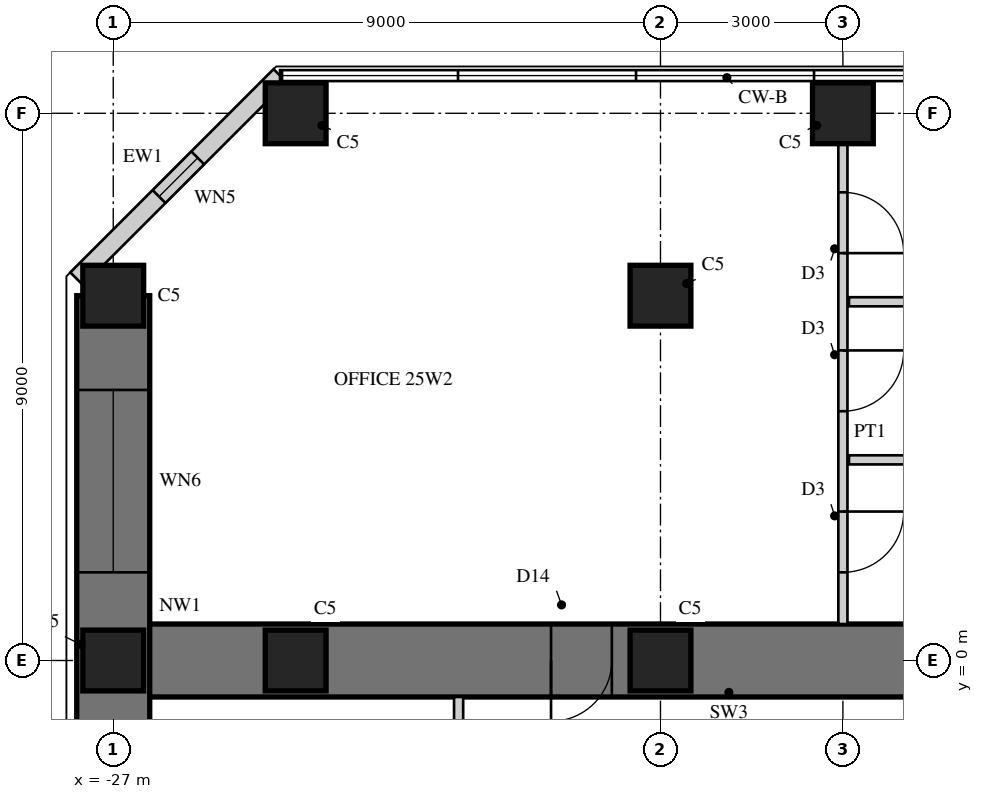
"""IFC4 building model, lengths in metres.
Left out: names, types, materials, properties, quantities, classifications, styles, units other than length and angle.
Written with IfcOpenShell. Run it as: python <this file> out.ifc"""

import sys

from ifc_helpers import new_model, si_unit, direction, frame, frame_2d, origin, origin_2d, place, context, subcontext, project, spatial, rectangle, hollow_rectangle, extrude, element, fill, save


model = new_model("IFC4")
c1 = context("Model", 3, precision=1e-05, world=origin(), true_north=direction((0.0, 1.0)))
c2 = subcontext(c1, "Body", "Model", "MODEL_VIEW")
j1 = project(units=[si_unit("LENGTHUNIT", "METRE"), si_unit("PLANEANGLEUNIT", "RADIAN")], contexts=[c1])
p1 = place(None, origin())
s1 = spatial("IfcSite", under=j1, at=p1, CompositionType="ELEMENT")
p2 = place(p1, origin())
s2 = spatial("IfcBuilding", under=s1, at=p2, CompositionType="ELEMENT")
p3 = place(p2, frame((0.0, 0.0, 104.5)))
s3 = spatial("IfcBuildingStorey", under=s2, at=p3, CompositionType="ELEMENT", Elevation=104.5)
p4 = place(p3, frame((-9.0, 0.0, 0.0), z_axis=(0.0, 0.0, 1.0), x_axis=(-1.0, 0.0, 0.0)))
e1 = element("IfcWall", 1, at=p4, inside=s3, PredefinedType="SHEAR", context=c2, shape_type="SweptSolid", body=[
    extrude(rectangle(XDim=18.0, YDim=1.2, at=frame_2d((9.0, 0.0))), origin(), (0.0, 0.0, 1.0), 4.0),
])
p5 = place(p4, frame((9.8, 0.0, 0.0)))
e2 = element("IfcOpeningElement", 2, at=p5, cuts=e1, PredefinedType="OPENING", context=c2, shape_type="SweptSolid", body=[
    extrude(rectangle(XDim=1.0, YDim=2.2, at=frame_2d((0.5, 1.1))), frame((0.0, 0.61, 0.0), z_axis=(0.0, -1.0, 0.0), x_axis=(1.0, 0.0, 0.0)), (0.0, 0.0, 1.0), 1.22),
])
p6 = place(p3, frame((-27.0, 6.0, 0.0), z_axis=(0.0, 0.0, 1.0), x_axis=(0.0, -1.0, 0.0)))
e3 = element("IfcWall", 3, at=p6, inside=s3, PredefinedType="SHEAR", context=c2, shape_type="SweptSolid", body=[
    extrude(rectangle(XDim=12.0, YDim=1.2, at=frame_2d((6.0, 0.0))), origin(), (0.0, 0.0, 1.0), 4.0),
])
p7 = place(p6, frame((1.55, 0.0, 0.6)))
e4 = element("IfcOpeningElement", 4, at=p7, cuts=e3, PredefinedType="OPENING", context=c2, shape_type="SweptSolid", body=[
    extrude(rectangle(XDim=3.0, YDim=2.4, at=frame_2d((1.5, 1.2))), frame((0.0, 0.61, 0.0), z_axis=(0.0, -1.0, 0.0), x_axis=(1.0, 0.0, 0.0)), (0.0, 0.0, 1.0), 1.22),
])
p8 = place(p6, frame((7.45, 0.0, 0.6)))
e5 = element("IfcOpeningElement", 5, at=p8, cuts=e3, PredefinedType="OPENING", context=c2, shape_type="SweptSolid", body=[
    extrude(rectangle(XDim=3.0, YDim=2.4, at=frame_2d((1.5, 1.2))), frame((0.0, 0.61, 0.0), z_axis=(0.0, -1.0, 0.0), x_axis=(1.0, 0.0, 0.0)), (0.0, 0.0, 1.0), 1.22),
])
for number, where, z_axis, x_axis in (
    (6, (-15.0, 9.0, 0.0), (0.0, 0.0, 1.0), (1.0, 0.0, 0.0)),
    (7, (-24.0, 9.0, 0.0), (0.0, 0.0, 1.0), (1.0, 0.0, 0.0)),
    (8, (-27.0, 6.0, 0.0), (0.0, 0.0, 1.0), (1.0, 0.0, 0.0)),
    (9, (-27.0, 0.0, 0.0), (0.0, 0.0, 1.0), (1.0, 0.0, 0.0)),
    (10, (-18.0, 6.0, 0.0), (0.0, 0.0, 1.0), (1.0, 0.0, 0.0)),
    (11, (-18.0, 0.0, 0.0), (0.0, 0.0, 1.0), (1.0, 0.0, 0.0)),
    (12, (-24.0, 0.0, 0.0), (0.0, 0.0, 1.0), (1.0, 0.0, 0.0)),
):
    element("IfcColumn", number, at=place(p3, frame(where, z_axis=z_axis, x_axis=x_axis)), inside=s3, PredefinedType="COLUMN", context=c2, shape_type="SweptSolid", body=[
        extrude(rectangle(XDim=1.0, YDim=1.0, at=origin_2d()), origin(), (0.0, 0.0, 1.0), 4.0),
    ])
p9 = place(p3, frame((-24.257, 9.62, 0.0), z_axis=(0.0, 0.0, 1.0), x_axis=(-0.707106781187, -0.707106781187, 0.0)))
e13 = element("IfcWall", 13, at=p9, inside=s3, PredefinedType="SOLIDWALL", context=c2, shape_type="SweptSolid", body=[
    extrude(rectangle(XDim=4.728, YDim=0.3, at=frame_2d((2.364, 0.0))), origin(), (0.0, 0.0, 1.0), 3.8),
])
p10 = place(p9, frame((1.914, 0.0, 0.3)))
e14 = element("IfcOpeningElement", 14, at=p10, cuts=e13, PredefinedType="OPENING", context=c2, shape_type="SweptSolid", body=[
    extrude(rectangle(XDim=0.9, YDim=2.4, at=frame_2d((0.45, 1.2))), frame((0.0, 0.16, 0.0), z_axis=(0.0, -1.0, 0.0), x_axis=(1.0, 0.0, 0.0)), (0.0, 0.0, 1.0), 0.32),
])
p11 = place(p3, frame((-15.0, 8.5, 0.0), z_axis=(0.0, 0.0, 1.0), x_axis=(0.0, -1.0, 0.0)))
e15 = element("IfcWall", 15, at=p11, inside=s3, PredefinedType="PARTITIONING", context=c2, shape_type="SweptSolid", body=[
    extrude(rectangle(XDim=7.9, YDim=0.15, at=frame_2d((3.95, 0.0))), origin(), (0.0, 0.0, 1.0), 3.0),
])
p12 = place(p11, frame((0.8, 0.0, 0.0)))
e16 = element("IfcOpeningElement", 16, at=p12, cuts=e15, PredefinedType="OPENING", context=c2, shape_type="SweptSolid", body=[
    extrude(rectangle(XDim=1.0, YDim=2.1, at=frame_2d((0.5, 1.05))), frame((0.0, 0.085, 0.0), z_axis=(0.0, -1.0, 0.0), x_axis=(1.0, 0.0, 0.0)), (0.0, 0.0, 1.0), 0.17),
])
p13 = place(p11, frame((3.4, 0.0, 0.0)))
e17 = element("IfcOpeningElement", 17, at=p13, cuts=e15, PredefinedType="OPENING", context=c2, shape_type="SweptSolid", body=[
    extrude(rectangle(XDim=1.0, YDim=2.1, at=frame_2d((0.5, 1.05))), frame((0.0, 0.085, 0.0), z_axis=(0.0, -1.0, 0.0), x_axis=(1.0, 0.0, 0.0)), (0.0, 0.0, 1.0), 0.17),
])
p14 = place(p11, frame((6.05, 0.0, 0.0)))
e18 = element("IfcOpeningElement", 18, at=p14, cuts=e15, PredefinedType="OPENING", context=c2, shape_type="SweptSolid", body=[
    extrude(rectangle(XDim=1.0, YDim=2.1, at=frame_2d((0.5, 1.05))), frame((0.0, 0.085, 0.0), z_axis=(0.0, -1.0, 0.0), x_axis=(1.0, 0.0, 0.0)), (0.0, 0.0, 1.0), 0.17),
])
p15 = place(p3, frame((-9.65, 3.3, 0.0), z_axis=(0.0, 0.0, 1.0), x_axis=(-1.0, 0.0, 0.0)))
e19 = element("IfcWall", 19, at=p15, inside=s3, PredefinedType="PARTITIONING", context=c2, shape_type="SweptSolid", body=[
    extrude(rectangle(XDim=5.25, YDim=0.15, at=frame_2d((2.625, 0.0))), origin(), (0.0, 0.0, 1.0), 3.8),
])
p16 = place(p3, frame((-9.65, 5.9, 0.0), z_axis=(0.0, 0.0, 1.0), x_axis=(-1.0, 0.0, 0.0)))
e20 = element("IfcWall", 20, at=p16, inside=s3, PredefinedType="PARTITIONING", context=c2, shape_type="SweptSolid", body=[
    extrude(rectangle(XDim=5.25, YDim=0.15, at=frame_2d((2.625, 0.0))), origin(), (0.0, 0.0, 1.0), 3.1),
])
p17 = place(p3, frame((-21.32, -0.6, 0.0), z_axis=(0.0, 0.0, 1.0), x_axis=(0.0, -1.0, 0.0)))
e21 = element("IfcWall", 21, at=p17, inside=s3, PredefinedType="PARTITIONING", context=c2, shape_type="SweptSolid", body=[
    extrude(rectangle(XDim=8.98, YDim=0.15, at=frame_2d((4.49, 0.0))), origin(), (0.0, 0.0, 1.0), 3.8),
])
p18 = place(p17, frame((0.45, 0.0, 0.0)))
e22 = element("IfcOpeningElement", 22, at=p18, cuts=e21, PredefinedType="OPENING", context=c2, shape_type="SweptSolid", body=[
    extrude(rectangle(XDim=1.0, YDim=2.2, at=frame_2d((0.5, 1.1))), frame((0.0, 0.085, 0.0), z_axis=(0.0, -1.0, 0.0), x_axis=(1.0, 0.0, 0.0)), (0.0, 0.0, 1.0), 0.17),
])
p19 = place(p10, origin())
e23 = element("IfcWindow", 23, at=p19, inside=s3, PartitioningType="SINGLE_PANEL", PredefinedType="WINDOW", context=c2, shape_type="SweptSolid", body=[
    extrude(hollow_rectangle(XDim=0.9, YDim=2.4, WallThickness=0.06, at=frame_2d((0.45, 1.2))), frame((0.0, 0.03, 0.0), z_axis=(0.0, -1.0, 0.0), x_axis=(1.0, 0.0, 0.0)), (0.0, 0.0, 1.0), 0.06),
    extrude(rectangle(XDim=0.779, YDim=2.279, at=frame_2d((0.45, 1.2))), frame((0.0, 0.03, 0.0), z_axis=(0.0, -1.0, 0.0), x_axis=(1.0, 0.0, 0.0)), (0.0, 0.0, 1.0), 0.06),
])
fill(e14, e23)
p20 = place(p7, origin())
e24 = element("IfcWindow", 24, at=p20, inside=s3, PartitioningType="SINGLE_PANEL", PredefinedType="WINDOW", context=c2, shape_type="SweptSolid", body=[
    extrude(hollow_rectangle(XDim=3.0, YDim=2.4, WallThickness=0.06, at=frame_2d((1.5, 1.2))), frame((0.0, 0.03, 0.0), z_axis=(0.0, -1.0, 0.0), x_axis=(1.0, 0.0, 0.0)), (0.0, 0.0, 1.0), 0.06),
    extrude(rectangle(XDim=2.879, YDim=2.279, at=frame_2d((1.5, 1.2))), frame((0.0, 0.03, 0.0), z_axis=(0.0, -1.0, 0.0), x_axis=(1.0, 0.0, 0.0)), (0.0, 0.0, 1.0), 0.06),
])
fill(e4, e24)
p21 = place(p12, origin())
e25 = element("IfcDoor", 25, at=p21, inside=s3, OperationType="SINGLE_SWING_RIGHT", PredefinedType="DOOR", context=c2, shape_type="SweptSolid", body=[
    extrude(rectangle(XDim=1.0, YDim=2.1, at=frame_2d((0.5, 1.05))), frame((0.0, 0.025, 0.0), z_axis=(0.0, -1.0, 0.0), x_axis=(1.0, 0.0, 0.0)), (0.0, 0.0, 1.0), 0.05),
])
fill(e16, e25)
p22 = place(p13, origin())
e26 = element("IfcDoor", 26, at=p22, inside=s3, OperationType="SINGLE_SWING_LEFT", PredefinedType="DOOR", context=c2, shape_type="SweptSolid", body=[
    extrude(rectangle(XDim=1.0, YDim=2.1, at=frame_2d((0.5, 1.05))), frame((0.0, 0.025, 0.0), z_axis=(0.0, -1.0, 0.0), x_axis=(1.0, 0.0, 0.0)), (0.0, 0.0, 1.0), 0.05),
])
fill(e17, e26)
p23 = place(p14, origin())
e27 = element("IfcDoor", 27, at=p23, inside=s3, OperationType="SINGLE_SWING_LEFT", PredefinedType="DOOR", context=c2, shape_type="SweptSolid", body=[
    extrude(rectangle(XDim=1.0, YDim=2.1, at=frame_2d((0.5, 1.05))), frame((0.0, 0.025, 0.0), z_axis=(0.0, -1.0, 0.0), x_axis=(1.0, 0.0, 0.0)), (0.0, 0.0, 1.0), 0.05),
])
fill(e18, e27)
p24 = place(p5, origin())
e28 = element("IfcDoor", 28, at=p24, inside=s3, OperationType="SINGLE_SWING_RIGHT", PredefinedType="DOOR", context=c2, shape_type="SweptSolid", body=[
    extrude(rectangle(XDim=1.0, YDim=2.2, at=frame_2d((0.5, 1.1))), frame((0.0, 0.025, 0.0), z_axis=(0.0, -1.0, 0.0), x_axis=(1.0, 0.0, 0.0)), (0.0, 0.0, 1.0), 0.05),
])
fill(e2, e28)
save(model, sys.argv[1])
